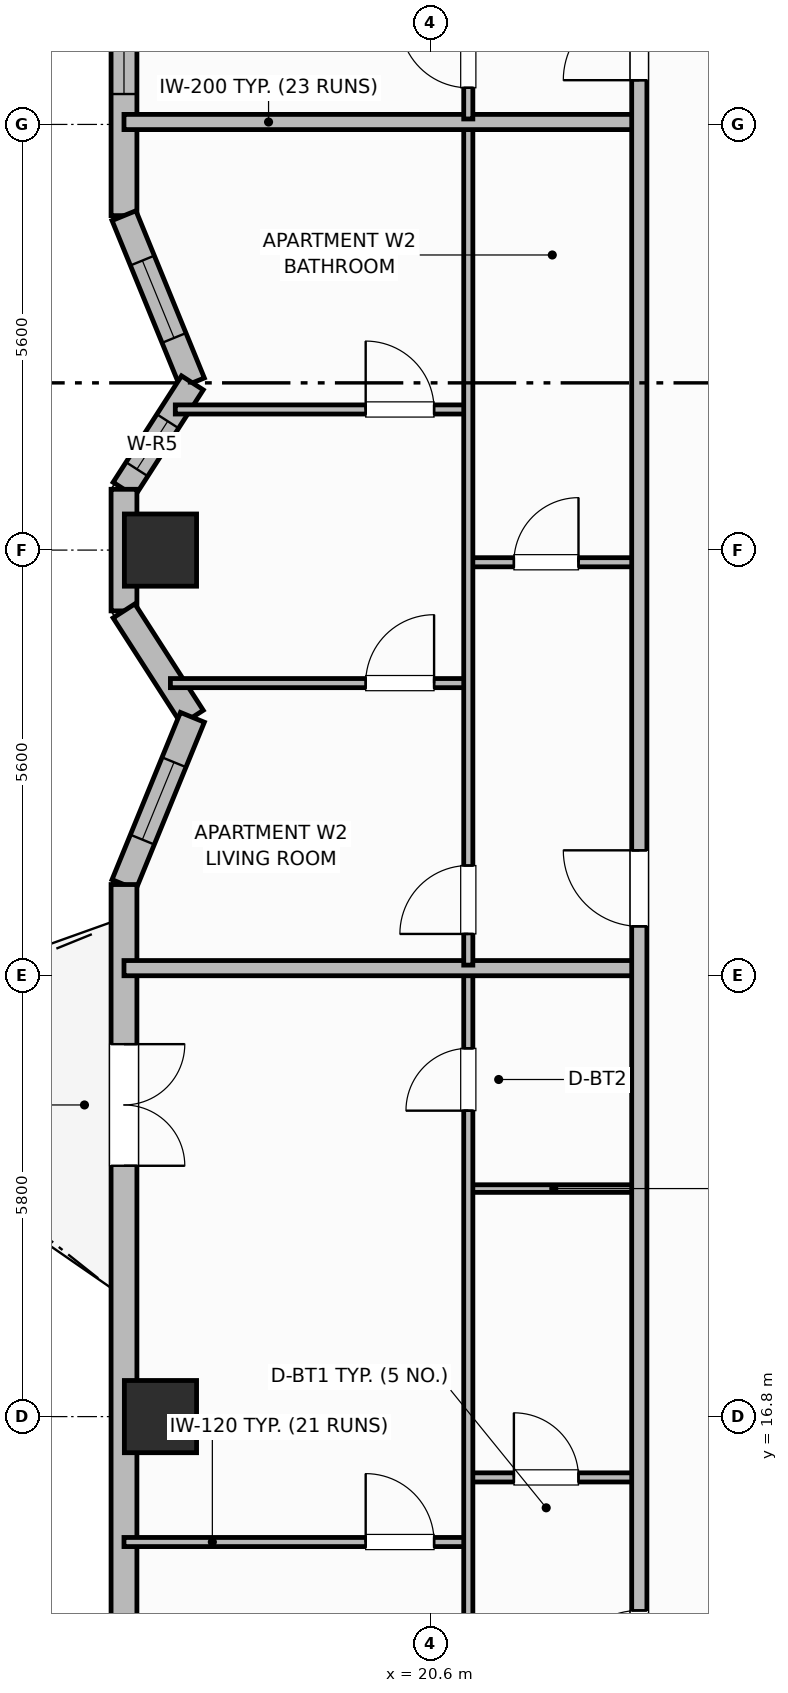
"""IFC4 building model, lengths in metres.
Left out: names, types, materials, properties, quantities, classifications, styles, units other than length and angle.
Written with IfcOpenShell. Run it as: python <this file> out.ifc"""

import sys

from ifc_helpers import new_model, si_unit, direction, frame, frame_2d, origin, origin_2d, place, context, subcontext, project, spatial, rectangle, extrude, element, fill, save


model = new_model("IFC4")
c1 = context("Model", 3, precision=1e-05, world=origin(), true_north=direction((0.0, 1.0)))
c2 = subcontext(c1, "Body", "Model", "MODEL_VIEW")
j1 = project(units=[si_unit("LENGTHUNIT", "METRE"), si_unit("PLANEANGLEUNIT", "RADIAN")], contexts=[c1])
p1 = place(None, origin())
s1 = spatial("IfcSite", under=j1, at=p1, CompositionType="ELEMENT")
p2 = place(p1, origin())
s2 = spatial("IfcBuilding", under=s1, at=p2, CompositionType="ELEMENT")
p3 = place(p2, frame((0.0, 0.0, 158.9)))
s3 = spatial("IfcBuildingStorey", under=s2, at=p3, CompositionType="ELEMENT", Elevation=158.9)
for number, where, z_axis, x_axis in (
    (1, (17.05, 16.8, 0.0), (0.0, 0.0, 1.0), (1.0, 0.0, 0.0)),
    (2, (17.05, 28.2, 0.0), (0.0, 0.0, 1.0), (1.0, 0.0, 0.0)),
):
    element("IfcColumn", number, at=place(p3, frame(where, z_axis=z_axis, x_axis=x_axis)), inside=s3, PredefinedType="COLUMN", context=c2, shape_type="SweptSolid", body=[
        extrude(rectangle(XDim=0.95, YDim=0.95, at=origin_2d()), origin(), (0.0, 0.0, 1.0), 3.7),
    ])
p4 = place(p3, frame((16.57, 45.9, 0.0), z_axis=(0.0, 0.0, 1.0), x_axis=(0.0, -1.0, 0.0)))
e3 = element("IfcWall", 3, at=p4, inside=s3, PredefinedType="SOLIDWALL", context=c2, shape_type="SweptSolid", body=[
    extrude(rectangle(XDim=13.3, YDim=0.34, at=frame_2d((6.65, 0.0))), origin(), (0.0, 0.0, 1.0), 2.72),
])
p5 = place(p4, frame((1.6, 0.0, 0.95)))
e4 = element("IfcOpeningElement", 4, at=p5, cuts=e3, PredefinedType="OPENING", context=c2, shape_type="SweptSolid", body=[
    extrude(rectangle(XDim=1.1, YDim=1.65, at=frame_2d((0.55, 0.825))), frame((0.0, 0.18, 0.0), z_axis=(0.0, -1.0, 0.0), x_axis=(1.0, 0.0, 0.0)), (0.0, 0.0, 1.0), 0.36),
])
p6 = place(p4, frame((4.36, 0.0, 0.71)))
e5 = element("IfcOpeningElement", 5, at=p6, cuts=e3, PredefinedType="OPENING", context=c2, shape_type="SweptSolid", body=[
    extrude(rectangle(XDim=1.4, YDim=1.85, at=frame_2d((0.7, 0.925))), frame((0.0, 0.18, 0.0), z_axis=(0.0, -1.0, 0.0), x_axis=(1.0, 0.0, 0.0)), (0.0, 0.0, 1.0), 0.36),
])
p7 = place(p4, frame((8.65, 0.0, 0.95)))
e6 = element("IfcOpeningElement", 6, at=p7, cuts=e3, PredefinedType="OPENING", context=c2, shape_type="SweptSolid", body=[
    extrude(rectangle(XDim=1.1, YDim=1.65, at=frame_2d((0.55, 0.825))), frame((0.0, 0.18, 0.0), z_axis=(0.0, -1.0, 0.0), x_axis=(1.0, 0.0, 0.0)), (0.0, 0.0, 1.0), 0.36),
])
p8 = place(p4, frame((10.6, 0.0, 0.95)))
e7 = element("IfcOpeningElement", 7, at=p8, cuts=e3, PredefinedType="OPENING", context=c2, shape_type="SweptSolid", body=[
    extrude(rectangle(XDim=1.1, YDim=1.65, at=frame_2d((0.55, 0.825))), frame((0.0, 0.18, 0.0), z_axis=(0.0, -1.0, 0.0), x_axis=(1.0, 0.0, 0.0)), (0.0, 0.0, 1.0), 0.36),
])
p9 = place(p3, frame((16.57, 32.6, 0.0), z_axis=(0.0, 0.0, 1.0), x_axis=(0.378568858991, -0.925573130013, 0.0)))
e8 = element("IfcWall", 8, at=p9, inside=s3, PredefinedType="SOLIDWALL", context=c2, shape_type="SweptSolid", body=[
    extrude(rectangle(XDim=2.377, YDim=0.34, at=frame_2d((1.188, 0.0))), origin(), (0.0, 0.0, 1.0), 2.72),
])
p10 = place(p9, frame((0.638, 0.0, 0.91)))
e9 = element("IfcOpeningElement", 9, at=p10, cuts=e8, PredefinedType="OPENING", context=c2, shape_type="SweptSolid", body=[
    extrude(rectangle(XDim=1.1, YDim=1.65, at=frame_2d((0.55, 0.825))), frame((0.0, 0.18, 0.0), z_axis=(0.0, -1.0, 0.0), x_axis=(1.0, 0.0, 0.0)), (0.0, 0.0, 1.0), 0.36),
])
p11 = place(p3, frame((17.47, 30.4, 0.0), z_axis=(0.0, 0.0, 1.0), x_axis=(-0.540742762169, -0.841188008214, 0.0)))
e10 = element("IfcWall", 10, at=p11, inside=s3, PredefinedType="SOLIDWALL", context=c2, shape_type="SweptSolid", body=[
    extrude(rectangle(XDim=1.664, YDim=0.34, at=frame_2d((0.832, 0.0))), origin(), (0.0, 0.0, 1.0), 2.72),
])
p12 = place(p11, frame((0.6, 0.0, 0.91)))
e11 = element("IfcOpeningElement", 11, at=p12, cuts=e10, PredefinedType="OPENING", context=c2, shape_type="SweptSolid", body=[
    extrude(rectangle(XDim=0.75, YDim=1.65, at=frame_2d((0.375, 0.825))), frame((0.0, 0.18, 0.0), z_axis=(0.0, -1.0, 0.0), x_axis=(1.0, 0.0, 0.0)), (0.0, 0.0, 1.0), 0.36),
])
p13 = place(p3, frame((16.57, 29.0, 0.0), z_axis=(0.0, 0.0, 1.0), x_axis=(0.0, -1.0, 0.0)))
e12 = element("IfcWall", 12, at=p13, inside=s3, PredefinedType="SOLIDWALL", context=c2, shape_type="SweptSolid", body=[
    extrude(rectangle(XDim=1.6, YDim=0.34, at=frame_2d((0.8, 0.0))), origin(), (0.0, 0.0, 1.0), 2.72),
])
p14 = place(p3, frame((16.57, 27.4, 0.0), z_axis=(0.0, 0.0, 1.0), x_axis=(0.540742762169, -0.841188008214, 0.0)))
e13 = element("IfcWall", 13, at=p14, inside=s3, PredefinedType="SOLIDWALL", context=c2, shape_type="SweptSolid", body=[
    extrude(rectangle(XDim=1.664, YDim=0.34, at=frame_2d((0.832, 0.0))), origin(), (0.0, 0.0, 1.0), 2.72),
])
p15 = place(p3, frame((17.47, 26.0, 0.0), z_axis=(0.0, 0.0, 1.0), x_axis=(-0.378604849088, -0.925558408879, 0.0)))
e14 = element("IfcWall", 14, at=p15, inside=s3, PredefinedType="SOLIDWALL", context=c2, shape_type="SweptSolid", body=[
    extrude(rectangle(XDim=2.377, YDim=0.34, at=frame_2d((1.188, 0.0))), origin(), (0.0, 0.0, 1.0), 2.72),
])
p16 = place(p15, frame((0.638, 0.0, 0.91)))
e15 = element("IfcOpeningElement", 15, at=p16, cuts=e14, PredefinedType="OPENING", context=c2, shape_type="SweptSolid", body=[
    extrude(rectangle(XDim=1.1, YDim=1.65, at=frame_2d((0.55, 0.825))), frame((0.0, 0.18, 0.0), z_axis=(0.0, -1.0, 0.0), x_axis=(1.0, 0.0, 0.0)), (0.0, 0.0, 1.0), 0.36),
])
p17 = place(p3, frame((16.57, 23.8, 0.0), z_axis=(0.0, 0.0, 1.0), x_axis=(0.0, -1.0, 0.0)))
e16 = element("IfcWall", 16, at=p17, inside=s3, PredefinedType="SOLIDWALL", context=c2, shape_type="SweptSolid", body=[
    extrude(rectangle(XDim=13.3, YDim=0.34, at=frame_2d((6.65, 0.0))), origin(), (0.0, 0.0, 1.0), 2.72),
])
p18 = place(p17, frame((2.1, 0.0, 0.0)))
e17 = element("IfcOpeningElement", 17, at=p18, cuts=e16, PredefinedType="OPENING", context=c2, shape_type="SweptSolid", body=[
    extrude(rectangle(XDim=1.6, YDim=2.1, at=frame_2d((0.8, 1.05))), frame((0.0, 0.18, 0.0), z_axis=(0.0, -1.0, 0.0), x_axis=(1.0, 0.0, 0.0)), (0.0, 0.0, 1.0), 0.36),
])
p19 = place(p17, frame((9.6, 0.0, 0.7)))
e18 = element("IfcOpeningElement", 18, at=p19, cuts=e16, PredefinedType="OPENING", context=c2, shape_type="SweptSolid", body=[
    extrude(rectangle(XDim=2.1, YDim=1.9, at=frame_2d((1.05, 0.95))), frame((0.0, 0.18, 0.0), z_axis=(0.0, -1.0, 0.0), x_axis=(1.0, 0.0, 0.0)), (0.0, 0.0, 1.0), 0.36),
])
p20 = place(p3, frame((21.1, 16.0, 0.0), z_axis=(0.0, 0.0, 1.0), x_axis=(1.0, 0.0, 0.0)))
e19 = element("IfcWall", 19, at=p20, inside=s3, PredefinedType="PARTITIONING", context=c2, shape_type="SweptSolid", body=[
    extrude(rectangle(XDim=2.25, YDim=0.12, at=frame_2d((1.125, 0.0))), origin(), (0.0, 0.0, 1.0), 2.55),
])
p21 = place(p20, frame((0.6, 0.0, 0.0)))
e20 = element("IfcOpeningElement", 20, at=p21, cuts=e19, PredefinedType="OPENING", context=c2, shape_type="SweptSolid", body=[
    extrude(rectangle(XDim=0.85, YDim=2.1, at=frame_2d((0.425, 1.05))), frame((0.0, 0.07, 0.0), z_axis=(0.0, -1.0, 0.0), x_axis=(1.0, 0.0, 0.0)), (0.0, 0.0, 1.0), 0.14),
])
p22 = place(p3, frame((21.1, 19.8, 0.0), z_axis=(0.0, 0.0, 1.0), x_axis=(1.0, 0.0, 0.0)))
e21 = element("IfcWall", 21, at=p22, inside=s3, PredefinedType="PARTITIONING", context=c2, shape_type="SweptSolid", body=[
    extrude(rectangle(XDim=2.25, YDim=0.1, at=frame_2d((1.125, 0.0))), origin(), (0.0, 0.0, 1.0), 2.55),
])
p23 = place(p3, frame((16.57, 15.15, 0.0), z_axis=(0.0, 0.0, 1.0), x_axis=(1.0, 0.0, 0.0)))
e22 = element("IfcWall", 22, at=p23, inside=s3, PredefinedType="PARTITIONING", context=c2, shape_type="SweptSolid", body=[
    extrude(rectangle(XDim=4.53, YDim=0.12, at=frame_2d((2.265, 0.0))), origin(), (0.0, 0.0, 1.0), 2.55),
])
p24 = place(p23, frame((3.18, 0.0, 0.0)))
e23 = element("IfcOpeningElement", 23, at=p24, cuts=e22, PredefinedType="OPENING", context=c2, shape_type="SweptSolid", body=[
    extrude(rectangle(XDim=0.9, YDim=2.1, at=frame_2d((0.45, 1.05))), frame((0.0, 0.07, 0.0), z_axis=(0.0, -1.0, 0.0), x_axis=(1.0, 0.0, 0.0)), (0.0, 0.0, 1.0), 0.14),
])
p25 = place(p3, frame((21.1, 10.64, 0.0), z_axis=(0.0, 0.0, 1.0), x_axis=(0.0, 1.0, 0.0)))
e24 = element("IfcWall", 24, at=p25, inside=s3, PredefinedType="PARTITIONING", context=c2, shape_type="SweptSolid", body=[
    extrude(rectangle(XDim=12.02, YDim=0.12, at=frame_2d((6.01, 0.0))), origin(), (0.0, 0.0, 1.0), 2.55),
])
p26 = place(p25, frame((0.41, 0.0, 0.0)))
e25 = element("IfcOpeningElement", 25, at=p26, cuts=e24, PredefinedType="OPENING", context=c2, shape_type="SweptSolid", body=[
    extrude(rectangle(XDim=0.9, YDim=2.1, at=frame_2d((0.45, 1.05))), frame((0.0, 0.07, 0.0), z_axis=(0.0, -1.0, 0.0), x_axis=(1.0, 0.0, 0.0)), (0.0, 0.0, 1.0), 0.14),
])
p27 = place(p25, frame((10.185, 0.0, 0.0)))
e26 = element("IfcOpeningElement", 26, at=p27, cuts=e24, PredefinedType="OPENING", context=c2, shape_type="SweptSolid", body=[
    extrude(rectangle(XDim=0.82, YDim=2.08, at=frame_2d((0.41, 1.04))), frame((0.0, 0.07, 0.0), z_axis=(0.0, -1.0, 0.0), x_axis=(1.0, 0.0, 0.0)), (0.0, 0.0, 1.0), 0.14),
])
p28 = place(p3, frame((16.57, 22.7, 0.0), z_axis=(0.0, 0.0, 1.0), x_axis=(1.0, 0.0, 0.0)))
e27 = element("IfcWall", 27, at=p28, inside=s3, PredefinedType="PARTITIONING", context=c2, shape_type="SweptSolid", body=[
    extrude(rectangle(XDim=6.78, YDim=0.2, at=frame_2d((3.39, 0.0))), origin(), (0.0, 0.0, 1.0), 2.55),
])
p29 = place(p3, frame((21.1, 28.04, 0.0), z_axis=(0.0, 0.0, 1.0), x_axis=(1.0, 0.0, 0.0)))
e28 = element("IfcWall", 28, at=p29, inside=s3, PredefinedType="PARTITIONING", context=c2, shape_type="SweptSolid", body=[
    extrude(rectangle(XDim=2.25, YDim=0.12, at=frame_2d((1.125, 0.0))), origin(), (0.0, 0.0, 1.0), 2.55),
])
p30 = place(p29, frame((0.6, 0.0, 0.0)))
e29 = element("IfcOpeningElement", 29, at=p30, cuts=e28, PredefinedType="OPENING", context=c2, shape_type="SweptSolid", body=[
    extrude(rectangle(XDim=0.85, YDim=2.1, at=frame_2d((0.425, 1.05))), frame((0.0, 0.07, 0.0), z_axis=(0.0, -1.0, 0.0), x_axis=(1.0, 0.0, 0.0)), (0.0, 0.0, 1.0), 0.14),
])
p31 = place(p3, frame((17.181, 26.45, 0.0), z_axis=(0.0, 0.0, 1.0), x_axis=(1.0, 0.0, 0.0)))
e30 = element("IfcWall", 30, at=p31, inside=s3, PredefinedType="PARTITIONING", context=c2, shape_type="SweptSolid", body=[
    extrude(rectangle(XDim=3.919, YDim=0.12, at=frame_2d((1.96, 0.0))), origin(), (0.0, 0.0, 1.0), 2.55),
])
p32 = place(p31, frame((2.569, 0.0, 0.0)))
e31 = element("IfcOpeningElement", 31, at=p32, cuts=e30, PredefinedType="OPENING", context=c2, shape_type="SweptSolid", body=[
    extrude(rectangle(XDim=0.9, YDim=2.1, at=frame_2d((0.45, 1.05))), frame((0.0, 0.07, 0.0), z_axis=(0.0, -1.0, 0.0), x_axis=(1.0, 0.0, 0.0)), (0.0, 0.0, 1.0), 0.14),
])
p33 = place(p3, frame((17.245, 30.05, 0.0), z_axis=(0.0, 0.0, 1.0), x_axis=(1.0, 0.0, 0.0)))
e32 = element("IfcWall", 32, at=p33, inside=s3, PredefinedType="PARTITIONING", context=c2, shape_type="SweptSolid", body=[
    extrude(rectangle(XDim=3.855, YDim=0.12, at=frame_2d((1.927, 0.0))), origin(), (0.0, 0.0, 1.0), 2.55),
])
p34 = place(p33, frame((2.505, 0.0, 0.0)))
e33 = element("IfcOpeningElement", 33, at=p34, cuts=e32, PredefinedType="OPENING", context=c2, shape_type="SweptSolid", body=[
    extrude(rectangle(XDim=0.9, YDim=2.1, at=frame_2d((0.45, 1.05))), frame((0.0, 0.07, 0.0), z_axis=(0.0, -1.0, 0.0), x_axis=(1.0, 0.0, 0.0)), (0.0, 0.0, 1.0), 0.14),
])
p35 = place(p3, frame((21.1, 22.74, 0.0), z_axis=(0.0, 0.0, 1.0), x_axis=(0.0, 1.0, 0.0)))
e34 = element("IfcWall", 34, at=p35, inside=s3, PredefinedType="PARTITIONING", context=c2, shape_type="SweptSolid", body=[
    extrude(rectangle(XDim=11.052, YDim=0.12, at=frame_2d((5.526, 0.0))), origin(), (0.0, 0.0, 1.0), 2.55),
])
p36 = place(p35, frame((0.41, 0.0, 0.0)))
e35 = element("IfcOpeningElement", 35, at=p36, cuts=e34, PredefinedType="OPENING", context=c2, shape_type="SweptSolid", body=[
    extrude(rectangle(XDim=0.9, YDim=2.1, at=frame_2d((0.45, 1.05))), frame((0.0, 0.07, 0.0), z_axis=(0.0, -1.0, 0.0), x_axis=(1.0, 0.0, 0.0)), (0.0, 0.0, 1.0), 0.14),
])
p37 = place(p3, frame((16.57, 33.832, 0.0), z_axis=(0.0, 0.0, 1.0), x_axis=(1.0, 0.0, 0.0)))
e36 = element("IfcWall", 36, at=p37, inside=s3, PredefinedType="PARTITIONING", context=c2, shape_type="SweptSolid", body=[
    extrude(rectangle(XDim=6.78, YDim=0.2, at=frame_2d((3.39, 0.0))), origin(), (0.0, 0.0, 1.0), 2.55),
])
p38 = place(p3, frame((21.1, 33.872, 0.0), z_axis=(0.0, 0.0, 1.0), x_axis=(0.0, 1.0, 0.0)))
e37 = element("IfcWall", 37, at=p38, inside=s3, PredefinedType="PARTITIONING", context=c2, shape_type="SweptSolid", body=[
    extrude(rectangle(XDim=11.888, YDim=0.12, at=frame_2d((5.944, 0.0))), origin(), (0.0, 0.0, 1.0), 2.55),
])
p39 = place(p38, frame((0.41, 0.0, 0.0)))
e38 = element("IfcOpeningElement", 38, at=p39, cuts=e37, PredefinedType="OPENING", context=c2, shape_type="SweptSolid", body=[
    extrude(rectangle(XDim=0.9, YDim=2.1, at=frame_2d((0.45, 1.05))), frame((0.0, 0.07, 0.0), z_axis=(0.0, -1.0, 0.0), x_axis=(1.0, 0.0, 0.0)), (0.0, 0.0, 1.0), 0.14),
])
p40 = place(p38, frame((10.119, 0.0, 0.0)))
e39 = element("IfcOpeningElement", 39, at=p40, cuts=e37, PredefinedType="OPENING", context=c2, shape_type="SweptSolid", body=[
    extrude(rectangle(XDim=0.82, YDim=2.08, at=frame_2d((0.41, 1.04))), frame((0.0, 0.07, 0.0), z_axis=(0.0, -1.0, 0.0), x_axis=(1.0, 0.0, 0.0)), (0.0, 0.0, 1.0), 0.14),
])
p41 = place(p3, frame((23.35, 10.6, 0.0), z_axis=(0.0, 0.0, 1.0), x_axis=(0.0, 1.0, 0.0)))
e40 = element("IfcWall", 40, at=p41, inside=s3, PredefinedType="PARTITIONING", context=c2, shape_type="SweptSolid", body=[
    extrude(rectangle(XDim=35.2, YDim=0.2, at=frame_2d((17.6, 0.0))), origin(), (0.0, 0.0, 1.0), 2.55),
])
p42 = place(p41, frame((2.65, 0.0, 0.0)))
e41 = element("IfcOpeningElement", 41, at=p42, cuts=e40, PredefinedType="OPENING", context=c2, shape_type="SweptSolid", body=[
    extrude(rectangle(XDim=1.0, YDim=2.15, at=frame_2d((0.5, 1.075))), frame((0.0, 0.11, 0.0), z_axis=(0.0, -1.0, 0.0), x_axis=(1.0, 0.0, 0.0)), (0.0, 0.0, 1.0), 0.22),
])
p43 = place(p41, frame((12.65, 0.0, 0.0)))
e42 = element("IfcOpeningElement", 42, at=p43, cuts=e40, PredefinedType="OPENING", context=c2, shape_type="SweptSolid", body=[
    extrude(rectangle(XDim=1.0, YDim=2.15, at=frame_2d((0.5, 1.075))), frame((0.0, 0.11, 0.0), z_axis=(0.0, -1.0, 0.0), x_axis=(1.0, 0.0, 0.0)), (0.0, 0.0, 1.0), 0.22),
])
p44 = place(p41, frame((23.782, 0.0, 0.0)))
e43 = element("IfcOpeningElement", 43, at=p44, cuts=e40, PredefinedType="OPENING", context=c2, shape_type="SweptSolid", body=[
    extrude(rectangle(XDim=1.0, YDim=2.15, at=frame_2d((0.5, 1.075))), frame((0.0, 0.11, 0.0), z_axis=(0.0, -1.0, 0.0), x_axis=(1.0, 0.0, 0.0)), (0.0, 0.0, 1.0), 0.22),
])
p45 = place(p8, origin())
e44 = element("IfcWindow", 44, at=p45, inside=s3, PartitioningType="SINGLE_PANEL", PredefinedType="WINDOW", context=c2, shape_type="SweptSolid", body=[
    extrude(rectangle(XDim=1.1, YDim=1.65, at=frame_2d((0.55, 0.825))), frame((0.0, 0.03, 0.0), z_axis=(0.0, -1.0, 0.0), x_axis=(1.0, 0.0, 0.0)), (0.0, 0.0, 1.0), 0.06),
])
fill(e7, e44)
p46 = place(p10, origin())
e45 = element("IfcWindow", 45, at=p46, inside=s3, PartitioningType="SINGLE_PANEL", PredefinedType="WINDOW", context=c2, shape_type="SweptSolid", body=[
    extrude(rectangle(XDim=1.1, YDim=1.65, at=frame_2d((0.55, 0.825))), frame((0.0, 0.03, 0.0), z_axis=(0.0, -1.0, 0.0), x_axis=(1.0, 0.0, 0.0)), (0.0, 0.0, 1.0), 0.06),
])
fill(e9, e45)
p47 = place(p12, origin())
e46 = element("IfcWindow", 46, at=p47, inside=s3, PartitioningType="SINGLE_PANEL", PredefinedType="WINDOW", context=c2, shape_type="SweptSolid", body=[
    extrude(rectangle(XDim=0.75, YDim=1.65, at=frame_2d((0.375, 0.825))), frame((0.0, 0.03, 0.0), z_axis=(0.0, -1.0, 0.0), x_axis=(1.0, 0.0, 0.0)), (0.0, 0.0, 1.0), 0.06),
])
fill(e11, e46)
p48 = place(p16, origin())
e47 = element("IfcWindow", 47, at=p48, inside=s3, PartitioningType="SINGLE_PANEL", PredefinedType="WINDOW", context=c2, shape_type="SweptSolid", body=[
    extrude(rectangle(XDim=1.1, YDim=1.65, at=frame_2d((0.55, 0.825))), frame((0.0, 0.03, 0.0), z_axis=(0.0, -1.0, 0.0), x_axis=(1.0, 0.0, 0.0)), (0.0, 0.0, 1.0), 0.06),
])
fill(e15, e47)
p49 = place(p18, origin())
e48 = element("IfcDoor", 48, at=p49, inside=s3, OperationType="DOUBLE_DOOR_SINGLE_SWING", PredefinedType="DOOR", context=c2, shape_type="SweptSolid", body=[
    extrude(rectangle(XDim=1.6, YDim=2.1, at=frame_2d((0.8, 1.05))), frame((0.0, 0.025, 0.0), z_axis=(0.0, -1.0, 0.0), x_axis=(1.0, 0.0, 0.0)), (0.0, 0.0, 1.0), 0.05),
])
fill(e17, e48)
p50 = place(p21, origin())
e49 = element("IfcDoor", 49, at=p50, inside=s3, OperationType="SINGLE_SWING_LEFT", PredefinedType="DOOR", context=c2, shape_type="SweptSolid", body=[
    extrude(rectangle(XDim=0.85, YDim=2.1, at=frame_2d((0.425, 1.05))), frame((0.0, 0.025, 0.0), z_axis=(0.0, -1.0, 0.0), x_axis=(1.0, 0.0, 0.0)), (0.0, 0.0, 1.0), 0.05),
])
fill(e20, e49)
p51 = place(p24, origin())
e50 = element("IfcDoor", 50, at=p51, inside=s3, OperationType="SINGLE_SWING_LEFT", PredefinedType="DOOR", context=c2, shape_type="SweptSolid", body=[
    extrude(rectangle(XDim=0.9, YDim=2.1, at=frame_2d((0.45, 1.05))), frame((0.0, 0.025, 0.0), z_axis=(0.0, -1.0, 0.0), x_axis=(1.0, 0.0, 0.0)), (0.0, 0.0, 1.0), 0.05),
])
fill(e23, e50)
p52 = place(p27, origin())
e51 = element("IfcDoor", 51, at=p52, inside=s3, OperationType="SINGLE_SWING_LEFT", PredefinedType="DOOR", context=c2, shape_type="SweptSolid", body=[
    extrude(rectangle(XDim=0.82, YDim=2.08, at=frame_2d((0.41, 1.04))), frame((0.0, 0.025, 0.0), z_axis=(0.0, -1.0, 0.0), x_axis=(1.0, 0.0, 0.0)), (0.0, 0.0, 1.0), 0.05),
])
fill(e26, e51)
p53 = place(p30, origin())
e52 = element("IfcDoor", 52, at=p53, inside=s3, OperationType="SINGLE_SWING_RIGHT", PredefinedType="DOOR", context=c2, shape_type="SweptSolid", body=[
    extrude(rectangle(XDim=0.85, YDim=2.1, at=frame_2d((0.425, 1.05))), frame((0.0, 0.025, 0.0), z_axis=(0.0, -1.0, 0.0), x_axis=(1.0, 0.0, 0.0)), (0.0, 0.0, 1.0), 0.05),
])
fill(e29, e52)
p54 = place(p32, origin())
e53 = element("IfcDoor", 53, at=p54, inside=s3, OperationType="SINGLE_SWING_RIGHT", PredefinedType="DOOR", context=c2, shape_type="SweptSolid", body=[
    extrude(rectangle(XDim=0.9, YDim=2.1, at=frame_2d((0.45, 1.05))), frame((0.0, 0.025, 0.0), z_axis=(0.0, -1.0, 0.0), x_axis=(1.0, 0.0, 0.0)), (0.0, 0.0, 1.0), 0.05),
])
fill(e31, e53)
p55 = place(p34, origin())
e54 = element("IfcDoor", 54, at=p55, inside=s3, OperationType="SINGLE_SWING_LEFT", PredefinedType="DOOR", context=c2, shape_type="SweptSolid", body=[
    extrude(rectangle(XDim=0.9, YDim=2.1, at=frame_2d((0.45, 1.05))), frame((0.0, 0.025, 0.0), z_axis=(0.0, -1.0, 0.0), x_axis=(1.0, 0.0, 0.0)), (0.0, 0.0, 1.0), 0.05),
])
fill(e33, e54)
p56 = place(p36, origin())
e55 = element("IfcDoor", 55, at=p56, inside=s3, OperationType="SINGLE_SWING_LEFT", PredefinedType="DOOR", context=c2, shape_type="SweptSolid", body=[
    extrude(rectangle(XDim=0.9, YDim=2.1, at=frame_2d((0.45, 1.05))), frame((0.0, 0.025, 0.0), z_axis=(0.0, -1.0, 0.0), x_axis=(1.0, 0.0, 0.0)), (0.0, 0.0, 1.0), 0.05),
])
fill(e35, e55)
p57 = place(p39, origin())
e56 = element("IfcDoor", 56, at=p57, inside=s3, OperationType="SINGLE_SWING_RIGHT", PredefinedType="DOOR", context=c2, shape_type="SweptSolid", body=[
    extrude(rectangle(XDim=0.9, YDim=2.1, at=frame_2d((0.45, 1.05))), frame((0.0, 0.025, 0.0), z_axis=(0.0, -1.0, 0.0), x_axis=(1.0, 0.0, 0.0)), (0.0, 0.0, 1.0), 0.05),
])
fill(e38, e56)
p58 = place(p42, origin())
e57 = element("IfcDoor", 57, at=p58, inside=s3, OperationType="SINGLE_SWING_LEFT", PredefinedType="DOOR", context=c2, shape_type="SweptSolid", body=[
    extrude(rectangle(XDim=1.0, YDim=2.15, at=frame_2d((0.5, 1.075))), frame((0.0, 0.025, 0.0), z_axis=(0.0, -1.0, 0.0), x_axis=(1.0, 0.0, 0.0)), (0.0, 0.0, 1.0), 0.05),
])
fill(e41, e57)
p59 = place(p43, origin())
e58 = element("IfcDoor", 58, at=p59, inside=s3, OperationType="SINGLE_SWING_RIGHT", PredefinedType="DOOR", context=c2, shape_type="SweptSolid", body=[
    extrude(rectangle(XDim=1.0, YDim=2.15, at=frame_2d((0.5, 1.075))), frame((0.0, 0.025, 0.0), z_axis=(0.0, -1.0, 0.0), x_axis=(1.0, 0.0, 0.0)), (0.0, 0.0, 1.0), 0.05),
])
fill(e42, e58)
p60 = place(p44, origin())
e59 = element("IfcDoor", 59, at=p60, inside=s3, OperationType="SINGLE_SWING_LEFT", PredefinedType="DOOR", context=c2, shape_type="SweptSolid", body=[
    extrude(rectangle(XDim=1.0, YDim=2.15, at=frame_2d((0.5, 1.075))), frame((0.0, 0.025, 0.0), z_axis=(0.0, -1.0, 0.0), x_axis=(1.0, 0.0, 0.0)), (0.0, 0.0, 1.0), 0.05),
])
fill(e43, e59)
save(model, sys.argv[1])
